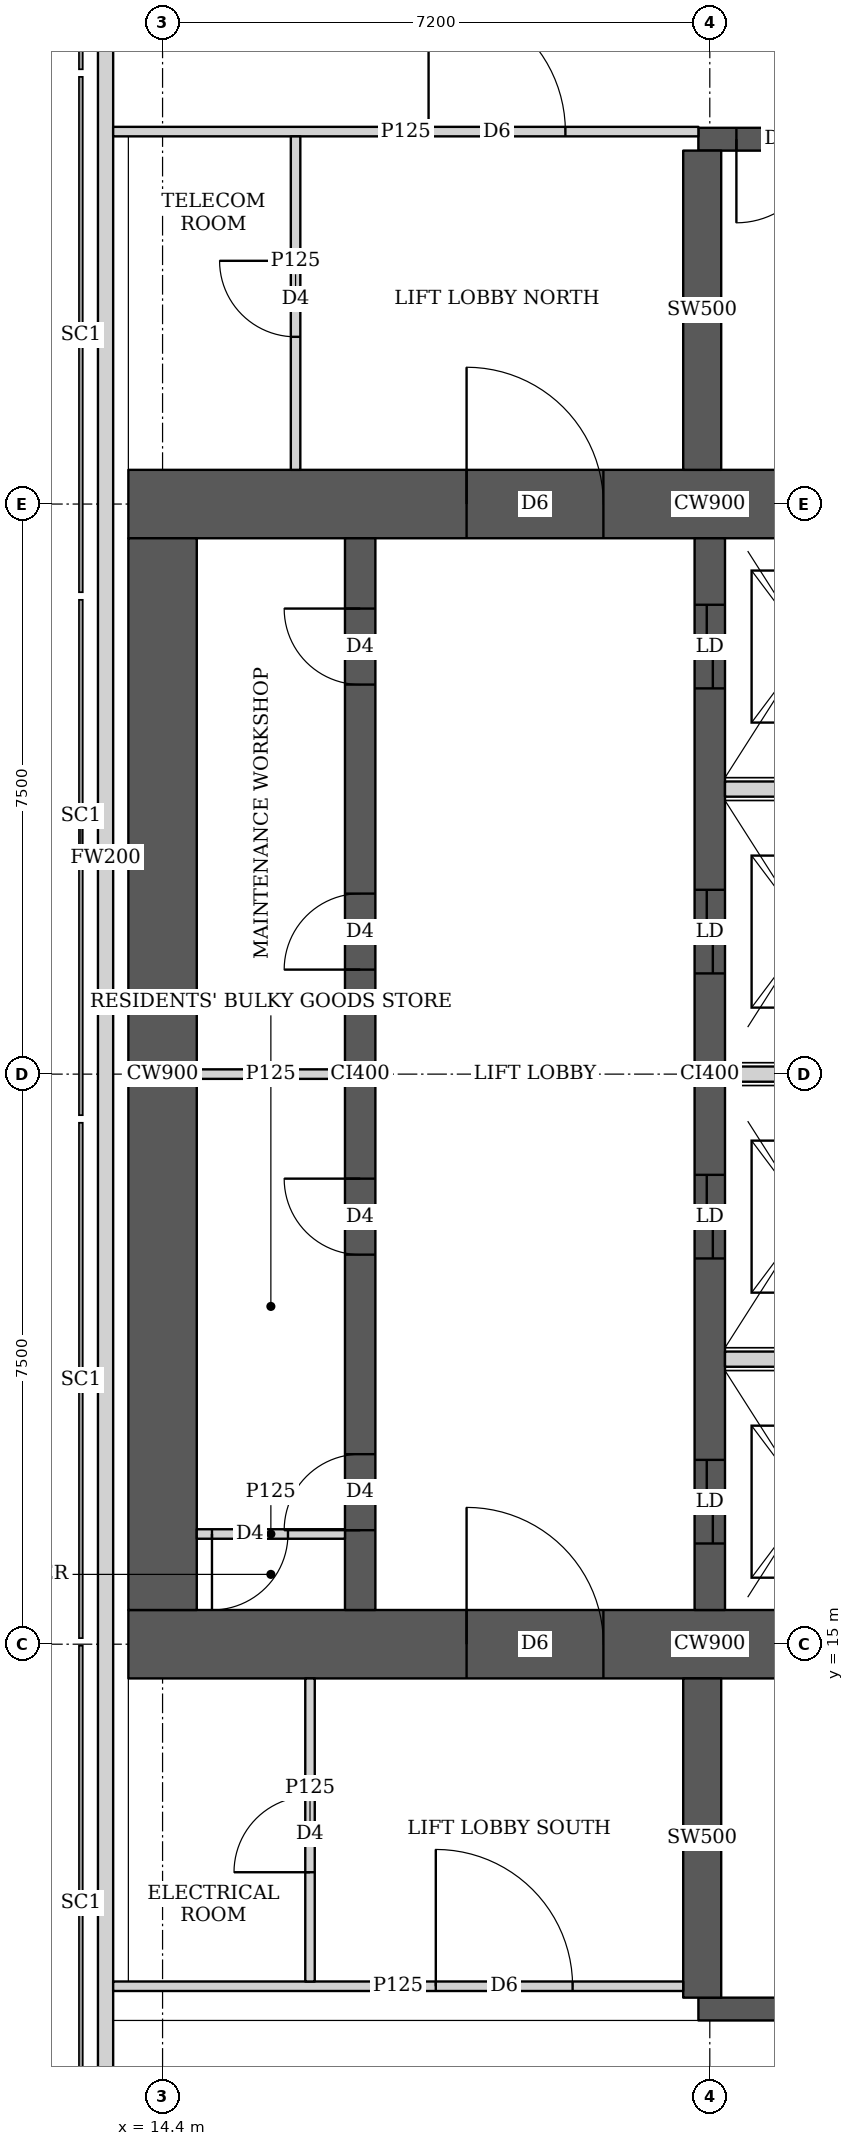
"""IFC4 building model, lengths in metres.
Left out: names, types, materials, properties, quantities, classifications, styles, units other than length and angle.
Written with IfcOpenShell. Run it as: python <this file> out.ifc"""

import sys

from ifc_helpers import new_model, si_unit, direction, frame, frame_2d, origin, place, context, subcontext, project, spatial, rectangle, extrude, element, fill, save


model = new_model("IFC4")
c1 = context("Model", 3, precision=1e-05, world=origin(), true_north=direction((0.0, 1.0)))
c2 = subcontext(c1, "Body", "Model", "MODEL_VIEW")
j1 = project(units=[si_unit("LENGTHUNIT", "METRE"), si_unit("PLANEANGLEUNIT", "RADIAN")], contexts=[c1])
p1 = place(None, origin())
s1 = spatial("IfcSite", under=j1, at=p1, CompositionType="ELEMENT")
p2 = place(p1, origin())
s2 = spatial("IfcBuilding", under=s1, at=p2, CompositionType="ELEMENT")
p3 = place(p2, frame((0.0, 0.0, 281.6)))
s3 = spatial("IfcBuildingStorey", under=s2, at=p3, CompositionType="ELEMENT", Elevation=281.6)
p4 = place(p3, frame((13.95, 15.0, 0.0), z_axis=(0.0, 0.0, 1.0), x_axis=(1.0, 0.0, 0.0)))
e1 = element("IfcWall", 1, at=p4, inside=s3, PredefinedType="SHEAR", context=c2, shape_type="SweptSolid", body=[
    extrude(rectangle(XDim=15.3, YDim=0.9, at=frame_2d((7.65, 0.0))), origin(), (0.0, 0.0, 1.0), 3.75),
])
p5 = place(p4, frame((4.45, 0.0, 0.0)))
e2 = element("IfcOpeningElement", 2, at=p5, cuts=e1, PredefinedType="OPENING", context=c2, shape_type="SweptSolid", body=[
    extrude(rectangle(XDim=1.8, YDim=2.1, at=frame_2d((0.9, 1.05))), frame((0.0, 0.46, 0.0), z_axis=(0.0, -1.0, 0.0), x_axis=(1.0, 0.0, 0.0)), (0.0, 0.0, 1.0), 0.92),
])
p6 = place(p4, frame((10.7, 0.0, 0.0)))
e3 = element("IfcOpeningElement", 3, at=p6, cuts=e1, PredefinedType="OPENING", context=c2, shape_type="SweptSolid", body=[
    extrude(rectangle(XDim=1.1, YDim=2.1, at=frame_2d((0.55, 1.05))), frame((0.0, 0.46, 0.0), z_axis=(0.0, -1.0, 0.0), x_axis=(1.0, 0.0, 0.0)), (0.0, 0.0, 1.0), 0.92),
])
p7 = place(p3, frame((13.95, 30.0, 0.0), z_axis=(0.0, 0.0, 1.0), x_axis=(1.0, 0.0, 0.0)))
e4 = element("IfcWall", 4, at=p7, inside=s3, PredefinedType="SHEAR", context=c2, shape_type="SweptSolid", body=[
    extrude(rectangle(XDim=15.3, YDim=0.9, at=frame_2d((7.65, 0.0))), origin(), (0.0, 0.0, 1.0), 3.75),
])
p8 = place(p7, frame((4.45, 0.0, 0.0)))
e5 = element("IfcOpeningElement", 5, at=p8, cuts=e4, PredefinedType="OPENING", context=c2, shape_type="SweptSolid", body=[
    extrude(rectangle(XDim=1.8, YDim=2.1, at=frame_2d((0.9, 1.05))), frame((0.0, 0.46, 0.0), z_axis=(0.0, -1.0, 0.0), x_axis=(1.0, 0.0, 0.0)), (0.0, 0.0, 1.0), 0.92),
])
p9 = place(p7, frame((10.7, 0.0, 0.0)))
e6 = element("IfcOpeningElement", 6, at=p9, cuts=e4, PredefinedType="OPENING", context=c2, shape_type="SweptSolid", body=[
    extrude(rectangle(XDim=1.1, YDim=2.1, at=frame_2d((0.55, 1.05))), frame((0.0, 0.46, 0.0), z_axis=(0.0, -1.0, 0.0), x_axis=(1.0, 0.0, 0.0)), (0.0, 0.0, 1.0), 0.92),
])
p10 = place(p3, frame((14.4, 15.45, 0.0), z_axis=(0.0, 0.0, 1.0), x_axis=(0.0, 1.0, 0.0)))
e7 = element("IfcWall", 7, at=p10, inside=s3, PredefinedType="SHEAR", context=c2, shape_type="SweptSolid", body=[
    extrude(rectangle(XDim=14.1, YDim=0.9, at=frame_2d((7.05, 0.0))), origin(), (0.0, 0.0, 1.0), 3.75),
])
p11 = place(p3, frame((17.0, 15.45, 0.0), z_axis=(0.0, 0.0, 1.0), x_axis=(0.0, 1.0, 0.0)))
e8 = element("IfcWall", 8, at=p11, inside=s3, PredefinedType="SHEAR", context=c2, shape_type="SweptSolid", body=[
    extrude(rectangle(XDim=14.1, YDim=0.4, at=frame_2d((7.05, 0.0))), origin(), (0.0, 0.0, 1.0), 3.75),
])
p12 = place(p11, frame((1.05, 0.0, 0.0)))
e9 = element("IfcOpeningElement", 9, at=p12, cuts=e8, PredefinedType="OPENING", context=c2, shape_type="SweptSolid", body=[
    extrude(rectangle(XDim=1.0, YDim=2.1, at=frame_2d((0.5, 1.05))), frame((0.0, 0.21, 0.0), z_axis=(0.0, -1.0, 0.0), x_axis=(1.0, 0.0, 0.0)), (0.0, 0.0, 1.0), 0.42),
])
p13 = place(p11, frame((4.675, 0.0, 0.0)))
e10 = element("IfcOpeningElement", 10, at=p13, cuts=e8, PredefinedType="OPENING", context=c2, shape_type="SweptSolid", body=[
    extrude(rectangle(XDim=1.0, YDim=2.1, at=frame_2d((0.5, 1.05))), frame((0.0, 0.21, 0.0), z_axis=(0.0, -1.0, 0.0), x_axis=(1.0, 0.0, 0.0)), (0.0, 0.0, 1.0), 0.42),
])
p14 = place(p11, frame((8.425, 0.0, 0.0)))
e11 = element("IfcOpeningElement", 11, at=p14, cuts=e8, PredefinedType="OPENING", context=c2, shape_type="SweptSolid", body=[
    extrude(rectangle(XDim=1.0, YDim=2.1, at=frame_2d((0.5, 1.05))), frame((0.0, 0.21, 0.0), z_axis=(0.0, -1.0, 0.0), x_axis=(1.0, 0.0, 0.0)), (0.0, 0.0, 1.0), 0.42),
])
p15 = place(p11, frame((12.175, 0.0, 0.0)))
e12 = element("IfcOpeningElement", 12, at=p15, cuts=e8, PredefinedType="OPENING", context=c2, shape_type="SweptSolid", body=[
    extrude(rectangle(XDim=1.0, YDim=2.1, at=frame_2d((0.5, 1.05))), frame((0.0, 0.21, 0.0), z_axis=(0.0, -1.0, 0.0), x_axis=(1.0, 0.0, 0.0)), (0.0, 0.0, 1.0), 0.42),
])
p16 = place(p3, frame((21.6, 15.45, 0.0), z_axis=(0.0, 0.0, 1.0), x_axis=(0.0, 1.0, 0.0)))
e13 = element("IfcWall", 13, at=p16, inside=s3, PredefinedType="SHEAR", context=c2, shape_type="SweptSolid", body=[
    extrude(rectangle(XDim=14.1, YDim=0.4, at=frame_2d((7.05, 0.0))), origin(), (0.0, 0.0, 1.0), 3.75),
])
p17 = place(p16, frame((0.875, 0.0, 0.0)))
e14 = element("IfcOpeningElement", 14, at=p17, cuts=e13, PredefinedType="OPENING", context=c2, shape_type="SweptSolid", body=[
    extrude(rectangle(XDim=1.1, YDim=2.1, at=frame_2d((0.55, 1.05))), frame((0.0, 0.21, 0.0), z_axis=(0.0, -1.0, 0.0), x_axis=(1.0, 0.0, 0.0)), (0.0, 0.0, 1.0), 0.42),
])
p18 = place(p16, frame((4.625, 0.0, 0.0)))
e15 = element("IfcOpeningElement", 15, at=p18, cuts=e13, PredefinedType="OPENING", context=c2, shape_type="SweptSolid", body=[
    extrude(rectangle(XDim=1.1, YDim=2.1, at=frame_2d((0.55, 1.05))), frame((0.0, 0.21, 0.0), z_axis=(0.0, -1.0, 0.0), x_axis=(1.0, 0.0, 0.0)), (0.0, 0.0, 1.0), 0.42),
])
p19 = place(p16, frame((8.375, 0.0, 0.0)))
e16 = element("IfcOpeningElement", 16, at=p19, cuts=e13, PredefinedType="OPENING", context=c2, shape_type="SweptSolid", body=[
    extrude(rectangle(XDim=1.1, YDim=2.1, at=frame_2d((0.55, 1.05))), frame((0.0, 0.21, 0.0), z_axis=(0.0, -1.0, 0.0), x_axis=(1.0, 0.0, 0.0)), (0.0, 0.0, 1.0), 0.42),
])
p20 = place(p16, frame((12.125, 0.0, 0.0)))
e17 = element("IfcOpeningElement", 17, at=p20, cuts=e13, PredefinedType="OPENING", context=c2, shape_type="SweptSolid", body=[
    extrude(rectangle(XDim=1.1, YDim=2.1, at=frame_2d((0.55, 1.05))), frame((0.0, 0.21, 0.0), z_axis=(0.0, -1.0, 0.0), x_axis=(1.0, 0.0, 0.0)), (0.0, 0.0, 1.0), 0.42),
])
p21 = place(p3, frame((21.45, 10.2, 0.0), z_axis=(0.0, 0.0, 1.0), x_axis=(1.0, 0.0, 0.0)))
e18 = element("IfcWall", 18, at=p21, inside=s3, PredefinedType="SHEAR", context=c2, shape_type="SweptSolid", body=[
    extrude(rectangle(XDim=7.5, YDim=0.3, at=frame_2d((3.75, 0.0))), origin(), (0.0, 0.0, 1.0), 3.75),
])
p22 = place(p21, frame((1.2, 0.0, 0.0)))
e19 = element("IfcOpeningElement", 19, at=p22, cuts=e18, PredefinedType="OPENING", context=c2, shape_type="SweptSolid", body=[
    extrude(rectangle(XDim=1.1, YDim=2.1, at=frame_2d((0.55, 1.05))), frame((0.0, 0.16, 0.0), z_axis=(0.0, -1.0, 0.0), x_axis=(1.0, 0.0, 0.0)), (0.0, 0.0, 1.0), 0.32),
])
p23 = place(p3, frame((21.5, 10.35, 0.0), z_axis=(0.0, 0.0, 1.0), x_axis=(0.0, 1.0, 0.0)))
e20 = element("IfcWall", 20, at=p23, inside=s3, PredefinedType="SHEAR", context=c2, shape_type="SweptSolid", body=[
    extrude(rectangle(XDim=4.2, YDim=0.5, at=frame_2d((2.1, 0.0))), origin(), (0.0, 0.0, 1.0), 3.75),
])
p24 = place(p3, frame((21.45, 34.8, 0.0), z_axis=(0.0, 0.0, 1.0), x_axis=(1.0, 0.0, 0.0)))
e21 = element("IfcWall", 21, at=p24, inside=s3, PredefinedType="SHEAR", context=c2, shape_type="SweptSolid", body=[
    extrude(rectangle(XDim=7.5, YDim=0.3, at=frame_2d((3.75, 0.0))), origin(), (0.0, 0.0, 1.0), 3.75),
])
p25 = place(p24, frame((0.5, 0.0, 0.0)))
e22 = element("IfcOpeningElement", 22, at=p25, cuts=e21, PredefinedType="OPENING", context=c2, shape_type="SweptSolid", body=[
    extrude(rectangle(XDim=1.1, YDim=2.1, at=frame_2d((0.55, 1.05))), frame((0.0, 0.16, 0.0), z_axis=(0.0, -1.0, 0.0), x_axis=(1.0, 0.0, 0.0)), (0.0, 0.0, 1.0), 0.32),
])
p26 = place(p3, frame((21.5, 30.45, 0.0), z_axis=(0.0, 0.0, 1.0), x_axis=(0.0, 1.0, 0.0)))
e23 = element("IfcWall", 23, at=p26, inside=s3, PredefinedType="SHEAR", context=c2, shape_type="SweptSolid", body=[
    extrude(rectangle(XDim=4.2, YDim=0.5, at=frame_2d((2.1, 0.0))), origin(), (0.0, 0.0, 1.0), 3.75),
])
p27 = place(p3, frame((13.65, 43.037, 0.0), z_axis=(0.0, 0.0, 1.0), x_axis=(0.0, -1.0, 0.0)))
e24 = element("IfcWall", 24, at=p27, inside=s3, PredefinedType="SOLIDWALL", context=c2, shape_type="SweptSolid", body=[
    extrude(rectangle(XDim=35.374, YDim=0.2, at=frame_2d((17.687, 0.0))), origin(), (0.0, 0.0, 1.0), 3.5),
])
p28 = place(p27, frame((1.959, 0.0, 0.9)))
e25 = element("IfcOpeningElement", 25, at=p28, cuts=e24, PredefinedType="OPENING", context=c2, shape_type="SweptSolid", body=[
    extrude(rectangle(XDim=1.8, YDim=1.5, at=frame_2d((0.9, 0.75))), frame((0.0, 0.11, 0.0), z_axis=(0.0, -1.0, 0.0), x_axis=(1.0, 0.0, 0.0)), (0.0, 0.0, 1.0), 0.22),
])
p29 = place(p3, frame((13.75, 10.5, 0.0), z_axis=(0.0, 0.0, 1.0), x_axis=(1.0, 0.0, 0.0)))
e26 = element("IfcWall", 26, at=p29, inside=s3, PredefinedType="PARTITIONING", context=c2, shape_type="SweptSolid", body=[
    extrude(rectangle(XDim=7.5, YDim=0.125, at=frame_2d((3.75, 0.0))), origin(), (0.0, 0.0, 1.0), 3.5),
])
p30 = place(p29, frame((4.245, 0.0, 0.0)))
e27 = element("IfcOpeningElement", 27, at=p30, cuts=e26, PredefinedType="OPENING", context=c2, shape_type="SweptSolid", body=[
    extrude(rectangle(XDim=1.8, YDim=2.1, at=frame_2d((0.9, 1.05))), frame((0.0, 0.073, 0.0), z_axis=(0.0, -1.0, 0.0), x_axis=(1.0, 0.0, 0.0)), (0.0, 0.0, 1.0), 0.145),
])
p31 = place(p3, frame((13.75, 34.9, 0.0), z_axis=(0.0, 0.0, 1.0), x_axis=(1.0, 0.0, 0.0)))
e28 = element("IfcWall", 28, at=p31, inside=s3, PredefinedType="PARTITIONING", context=c2, shape_type="SweptSolid", body=[
    extrude(rectangle(XDim=7.7, YDim=0.125, at=frame_2d((3.85, 0.0))), origin(), (0.0, 0.0, 1.0), 3.5),
])
p32 = place(p31, frame((4.15, 0.0, 0.0)))
e29 = element("IfcOpeningElement", 29, at=p32, cuts=e28, PredefinedType="OPENING", context=c2, shape_type="SweptSolid", body=[
    extrude(rectangle(XDim=1.8, YDim=2.1, at=frame_2d((0.9, 1.05))), frame((0.0, 0.073, 0.0), z_axis=(0.0, -1.0, 0.0), x_axis=(1.0, 0.0, 0.0)), (0.0, 0.0, 1.0), 0.145),
])
p33 = place(p3, frame((16.34, 10.562, 0.0), z_axis=(0.0, 0.0, 1.0), x_axis=(0.0, 1.0, 0.0)))
e30 = element("IfcWall", 30, at=p33, inside=s3, PredefinedType="PARTITIONING", context=c2, shape_type="SweptSolid", body=[
    extrude(rectangle(XDim=3.988, YDim=0.125, at=frame_2d((1.994, 0.0))), origin(), (0.0, 0.0, 1.0), 3.5),
])
p34 = place(p33, frame((1.438, 0.0, 0.0)))
e31 = element("IfcOpeningElement", 31, at=p34, cuts=e30, PredefinedType="OPENING", context=c2, shape_type="SweptSolid", body=[
    extrude(rectangle(XDim=1.0, YDim=2.1, at=frame_2d((0.5, 1.05))), frame((0.0, 0.073, 0.0), z_axis=(0.0, -1.0, 0.0), x_axis=(1.0, 0.0, 0.0)), (0.0, 0.0, 1.0), 0.145),
])
p35 = place(p3, frame((16.15, 30.45, 0.0), z_axis=(0.0, 0.0, 1.0), x_axis=(0.0, 1.0, 0.0)))
e32 = element("IfcWall", 32, at=p35, inside=s3, PredefinedType="PARTITIONING", context=c2, shape_type="SweptSolid", body=[
    extrude(rectangle(XDim=4.387, YDim=0.125, at=frame_2d((2.193, 0.0))), origin(), (0.0, 0.0, 1.0), 3.5),
])
p36 = place(p35, frame((1.75, 0.0, 0.0)))
e33 = element("IfcOpeningElement", 33, at=p36, cuts=e32, PredefinedType="OPENING", context=c2, shape_type="SweptSolid", body=[
    extrude(rectangle(XDim=1.0, YDim=2.1, at=frame_2d((0.5, 1.05))), frame((0.0, 0.073, 0.0), z_axis=(0.0, -1.0, 0.0), x_axis=(1.0, 0.0, 0.0)), (0.0, 0.0, 1.0), 0.145),
])
p37 = place(p3, frame((14.85, 16.45, 0.0), z_axis=(0.0, 0.0, 1.0), x_axis=(1.0, 0.0, 0.0)))
e34 = element("IfcWall", 34, at=p37, inside=s3, PredefinedType="PARTITIONING", context=c2, shape_type="SweptSolid", body=[
    extrude(rectangle(XDim=1.95, YDim=0.125, at=frame_2d((0.975, 0.0))), origin(), (0.0, 0.0, 1.0), 3.5),
])
p38 = place(p37, frame((0.2, 0.0, 0.0)))
e35 = element("IfcOpeningElement", 35, at=p38, cuts=e34, PredefinedType="OPENING", context=c2, shape_type="SweptSolid", body=[
    extrude(rectangle(XDim=1.0, YDim=2.1, at=frame_2d((0.5, 1.05))), frame((0.0, 0.073, 0.0), z_axis=(0.0, -1.0, 0.0), x_axis=(1.0, 0.0, 0.0)), (0.0, 0.0, 1.0), 0.145),
])
p39 = place(p3, frame((14.85, 22.5, 0.0), z_axis=(0.0, 0.0, 1.0), x_axis=(1.0, 0.0, 0.0)))
e36 = element("IfcWall", 36, at=p39, inside=s3, PredefinedType="PARTITIONING", context=c2, shape_type="SweptSolid", body=[
    extrude(rectangle(XDim=1.95, YDim=0.125, at=frame_2d((0.975, 0.0))), origin(), (0.0, 0.0, 1.0), 3.5),
])
for number, where, z_axis, x_axis in (
    (37, (21.8, 18.75, 0.0), (0.0, 0.0, 1.0), (1.0, 0.0, 0.0)),
    (38, (21.8, 22.5, 0.0), (0.0, 0.0, 1.0), (1.0, 0.0, 0.0)),
    (39, (21.8, 26.25, 0.0), (0.0, 0.0, 1.0), (1.0, 0.0, 0.0)),
):
    element("IfcWall", number, at=place(p3, frame(where, z_axis=z_axis, x_axis=x_axis)), inside=s3, PredefinedType="SOLIDWALL", context=c2, shape_type="SweptSolid", body=[
        extrude(rectangle(XDim=2.2, YDim=0.2, at=frame_2d((1.1, 0.0))), origin(), (0.0, 0.0, 1.0), 3.5),
    ])
p40 = place(p34, origin())
e40 = element("IfcDoor", 40, at=p40, inside=s3, OperationType="SINGLE_SWING_LEFT", PredefinedType="DOOR", context=c2, shape_type="SweptSolid", body=[
    extrude(rectangle(XDim=1.0, YDim=2.1, at=frame_2d((0.5, 1.05))), frame((0.0, 0.025, 0.0), z_axis=(0.0, -1.0, 0.0), x_axis=(1.0, 0.0, 0.0)), (0.0, 0.0, 1.0), 0.05),
])
fill(e31, e40)
p41 = place(p30, origin())
e41 = element("IfcDoor", 41, at=p41, inside=s3, OperationType="DOUBLE_DOOR_SINGLE_SWING", PredefinedType="DOOR", context=c2, shape_type="SweptSolid", body=[
    extrude(rectangle(XDim=1.8, YDim=2.1, at=frame_2d((0.9, 1.05))), frame((0.0, 0.025, 0.0), z_axis=(0.0, -1.0, 0.0), x_axis=(1.0, 0.0, 0.0)), (0.0, 0.0, 1.0), 0.05),
])
fill(e27, e41)
p42 = place(p36, origin())
e42 = element("IfcDoor", 42, at=p42, inside=s3, OperationType="SINGLE_SWING_RIGHT", PredefinedType="DOOR", context=c2, shape_type="SweptSolid", body=[
    extrude(rectangle(XDim=1.0, YDim=2.1, at=frame_2d((0.5, 1.05))), frame((0.0, 0.025, 0.0), z_axis=(0.0, -1.0, 0.0), x_axis=(1.0, 0.0, 0.0)), (0.0, 0.0, 1.0), 0.05),
])
fill(e33, e42)
p43 = place(p32, origin())
e43 = element("IfcDoor", 43, at=p43, inside=s3, OperationType="DOUBLE_DOOR_SINGLE_SWING", PredefinedType="DOOR", context=c2, shape_type="SweptSolid", body=[
    extrude(rectangle(XDim=1.8, YDim=2.1, at=frame_2d((0.9, 1.05))), frame((0.0, 0.025, 0.0), z_axis=(0.0, -1.0, 0.0), x_axis=(1.0, 0.0, 0.0)), (0.0, 0.0, 1.0), 0.05),
])
fill(e29, e43)
p44 = place(p38, origin())
e44 = element("IfcDoor", 44, at=p44, inside=s3, OperationType="SINGLE_SWING_RIGHT", PredefinedType="DOOR", context=c2, shape_type="SweptSolid", body=[
    extrude(rectangle(XDim=1.0, YDim=2.1, at=frame_2d((0.5, 1.05))), frame((0.0, 0.025, 0.0), z_axis=(0.0, -1.0, 0.0), x_axis=(1.0, 0.0, 0.0)), (0.0, 0.0, 1.0), 0.05),
])
fill(e35, e44)
p45 = place(p12, origin())
e45 = element("IfcDoor", 45, at=p45, inside=s3, OperationType="SINGLE_SWING_LEFT", PredefinedType="DOOR", context=c2, shape_type="SweptSolid", body=[
    extrude(rectangle(XDim=1.0, YDim=2.1, at=frame_2d((0.5, 1.05))), frame((0.0, 0.025, 0.0), z_axis=(0.0, -1.0, 0.0), x_axis=(1.0, 0.0, 0.0)), (0.0, 0.0, 1.0), 0.05),
])
fill(e9, e45)
p46 = place(p13, origin())
e46 = element("IfcDoor", 46, at=p46, inside=s3, OperationType="SINGLE_SWING_RIGHT", PredefinedType="DOOR", context=c2, shape_type="SweptSolid", body=[
    extrude(rectangle(XDim=1.0, YDim=2.1, at=frame_2d((0.5, 1.05))), frame((0.0, 0.025, 0.0), z_axis=(0.0, -1.0, 0.0), x_axis=(1.0, 0.0, 0.0)), (0.0, 0.0, 1.0), 0.05),
])
fill(e10, e46)
p47 = place(p14, origin())
e47 = element("IfcDoor", 47, at=p47, inside=s3, OperationType="SINGLE_SWING_LEFT", PredefinedType="DOOR", context=c2, shape_type="SweptSolid", body=[
    extrude(rectangle(XDim=1.0, YDim=2.1, at=frame_2d((0.5, 1.05))), frame((0.0, 0.025, 0.0), z_axis=(0.0, -1.0, 0.0), x_axis=(1.0, 0.0, 0.0)), (0.0, 0.0, 1.0), 0.05),
])
fill(e11, e47)
p48 = place(p15, origin())
e48 = element("IfcDoor", 48, at=p48, inside=s3, OperationType="SINGLE_SWING_RIGHT", PredefinedType="DOOR", context=c2, shape_type="SweptSolid", body=[
    extrude(rectangle(XDim=1.0, YDim=2.1, at=frame_2d((0.5, 1.05))), frame((0.0, 0.025, 0.0), z_axis=(0.0, -1.0, 0.0), x_axis=(1.0, 0.0, 0.0)), (0.0, 0.0, 1.0), 0.05),
])
fill(e12, e48)
p49 = place(p5, origin())
e49 = element("IfcDoor", 49, at=p49, inside=s3, OperationType="DOUBLE_DOOR_SINGLE_SWING", PredefinedType="DOOR", context=c2, shape_type="SweptSolid", body=[
    extrude(rectangle(XDim=1.8, YDim=2.1, at=frame_2d((0.9, 1.05))), frame((0.0, 0.025, 0.0), z_axis=(0.0, -1.0, 0.0), x_axis=(1.0, 0.0, 0.0)), (0.0, 0.0, 1.0), 0.05),
])
fill(e2, e49)
p50 = place(p8, origin())
e50 = element("IfcDoor", 50, at=p50, inside=s3, OperationType="DOUBLE_DOOR_SINGLE_SWING", PredefinedType="DOOR", context=c2, shape_type="SweptSolid", body=[
    extrude(rectangle(XDim=1.8, YDim=2.1, at=frame_2d((0.9, 1.05))), frame((0.0, 0.025, 0.0), z_axis=(0.0, -1.0, 0.0), x_axis=(1.0, 0.0, 0.0)), (0.0, 0.0, 1.0), 0.05),
])
fill(e5, e50)
p51 = place(p17, origin())
e51 = element("IfcDoor", 51, at=p51, inside=s3, OperationType="DOUBLE_DOOR_SLIDING", PredefinedType="DOOR", context=c2, shape_type="SweptSolid", body=[
    extrude(rectangle(XDim=1.1, YDim=2.1, at=frame_2d((0.55, 1.05))), frame((0.0, 0.025, 0.0), z_axis=(0.0, -1.0, 0.0), x_axis=(1.0, 0.0, 0.0)), (0.0, 0.0, 1.0), 0.05),
])
fill(e14, e51)
p52 = place(p18, origin())
e52 = element("IfcDoor", 52, at=p52, inside=s3, OperationType="DOUBLE_DOOR_SLIDING", PredefinedType="DOOR", context=c2, shape_type="SweptSolid", body=[
    extrude(rectangle(XDim=1.1, YDim=2.1, at=frame_2d((0.55, 1.05))), frame((0.0, 0.025, 0.0), z_axis=(0.0, -1.0, 0.0), x_axis=(1.0, 0.0, 0.0)), (0.0, 0.0, 1.0), 0.05),
])
fill(e15, e52)
p53 = place(p19, origin())
e53 = element("IfcDoor", 53, at=p53, inside=s3, OperationType="DOUBLE_DOOR_SLIDING", PredefinedType="DOOR", context=c2, shape_type="SweptSolid", body=[
    extrude(rectangle(XDim=1.1, YDim=2.1, at=frame_2d((0.55, 1.05))), frame((0.0, 0.025, 0.0), z_axis=(0.0, -1.0, 0.0), x_axis=(1.0, 0.0, 0.0)), (0.0, 0.0, 1.0), 0.05),
])
fill(e16, e53)
p54 = place(p20, origin())
e54 = element("IfcDoor", 54, at=p54, inside=s3, OperationType="DOUBLE_DOOR_SLIDING", PredefinedType="DOOR", context=c2, shape_type="SweptSolid", body=[
    extrude(rectangle(XDim=1.1, YDim=2.1, at=frame_2d((0.55, 1.05))), frame((0.0, 0.025, 0.0), z_axis=(0.0, -1.0, 0.0), x_axis=(1.0, 0.0, 0.0)), (0.0, 0.0, 1.0), 0.05),
])
fill(e17, e54)
p55 = place(p25, origin())
e55 = element("IfcDoor", 55, at=p55, inside=s3, OperationType="SINGLE_SWING_RIGHT", PredefinedType="DOOR", context=c2, shape_type="SweptSolid", body=[
    extrude(rectangle(XDim=1.1, YDim=2.1, at=frame_2d((0.55, 1.05))), frame((0.0, 0.025, 0.0), z_axis=(0.0, -1.0, 0.0), x_axis=(1.0, 0.0, 0.0)), (0.0, 0.0, 1.0), 0.05),
])
fill(e22, e55)
save(model, sys.argv[1])
